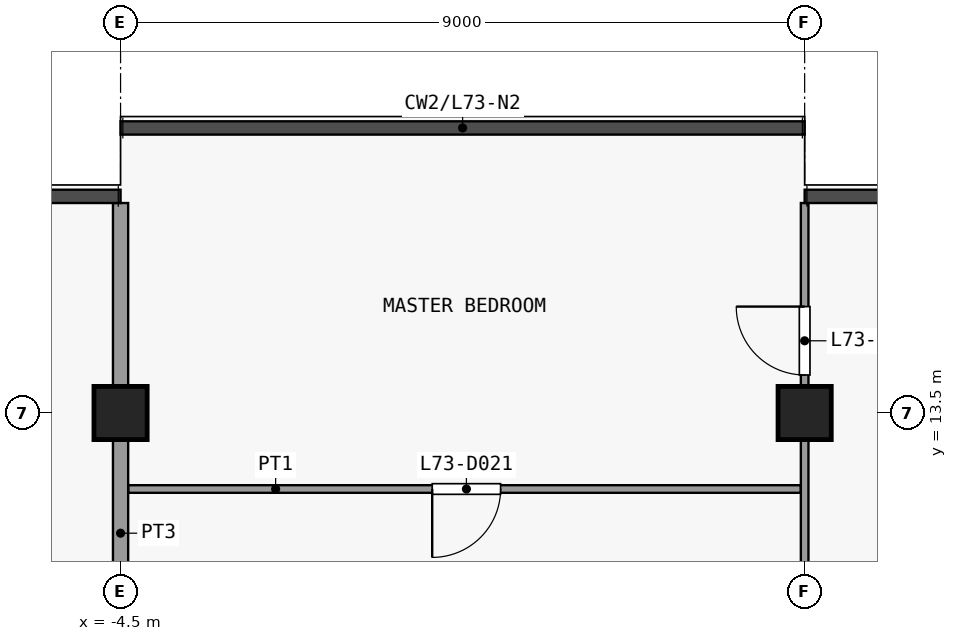
"""IFC4 building model, lengths in metres.
Left out: names, types, materials, properties, quantities, classifications, styles, units other than length and angle.
Written with IfcOpenShell. Run it as: python <this file> out.ifc"""

import sys

from ifc_helpers import new_model, si_unit, direction, frame, frame_2d, origin, origin_2d, place, context, subcontext, project, spatial, rectangle, extrude, element, fill, save


model = new_model("IFC4")
c1 = context("Model", 3, precision=1e-05, world=origin(), true_north=direction((0.0, 1.0)))
c2 = subcontext(c1, "Body", "Model", "MODEL_VIEW")
j1 = project(units=[si_unit("LENGTHUNIT", "METRE"), si_unit("PLANEANGLEUNIT", "RADIAN")], contexts=[c1])
p1 = place(None, origin())
s1 = spatial("IfcSite", under=j1, at=p1, CompositionType="ELEMENT")
p2 = place(p1, origin())
s2 = spatial("IfcBuilding", under=s1, at=p2, CompositionType="ELEMENT")
p3 = place(p2, frame((0.0, 0.0, 287.9)))
s3 = spatial("IfcBuildingStorey", under=s2, at=p3, CompositionType="ELEMENT", Elevation=287.9)
for number, where, z_axis, x_axis in (
    (1, (-4.5, 13.5, 0.0), (0.0, 0.0, 1.0), (1.0, 0.0, 0.0)),
    (2, (4.5, 13.5, 0.0), (0.0, 0.0, 1.0), (1.0, 0.0, 0.0)),
):
    element("IfcColumn", number, at=place(p3, frame(where, z_axis=z_axis, x_axis=x_axis)), inside=s3, PredefinedType="COLUMN", context=c2, shape_type="SweptSolid", body=[
        extrude(rectangle(XDim=0.7, YDim=0.7, at=origin_2d()), origin(), (0.0, 0.0, 1.0), 3.6),
    ])
p4 = place(p3, frame((-4.4, 12.5, 0.0), z_axis=(0.0, 0.0, 1.0), x_axis=(1.0, 0.0, 0.0)))
e3 = element("IfcWall", 3, at=p4, inside=s3, PredefinedType="PARTITIONING", context=c2, shape_type="SweptSolid", body=[
    extrude(rectangle(XDim=8.85, YDim=0.1, at=frame_2d((4.425, 0.0))), origin(), (0.0, 0.0, 1.0), 3.3),
])
p5 = place(p4, frame((4.0, 0.0, 0.0)))
e4 = element("IfcOpeningElement", 4, at=p5, cuts=e3, PredefinedType="OPENING", context=c2, shape_type="SweptSolid", body=[
    extrude(rectangle(XDim=0.9, YDim=2.1, at=frame_2d((0.45, 1.05))), frame((0.0, 0.06, 0.0), z_axis=(0.0, -1.0, 0.0), x_axis=(1.0, 0.0, 0.0)), (0.0, 0.0, 1.0), 0.12),
])
p6 = place(p3, frame((-4.5, 7.575, 0.0), z_axis=(0.0, 0.0, 1.0), x_axis=(0.0, 1.0, 0.0)))
e5 = element("IfcWall", 5, at=p6, inside=s3, PredefinedType="PARTITIONING", context=c2, shape_type="SweptSolid", body=[
    extrude(rectangle(XDim=8.688, YDim=0.2, at=frame_2d((4.344, 0.0))), origin(), (0.0, 0.0, 1.0), 3.3),
])
p7 = place(p3, frame((4.5, 7.575, 0.0), z_axis=(0.0, 0.0, 1.0), x_axis=(0.0, 1.0, 0.0)))
e6 = element("IfcWall", 6, at=p7, inside=s3, PredefinedType="PARTITIONING", context=c2, shape_type="SweptSolid", body=[
    extrude(rectangle(XDim=8.688, YDim=0.1, at=frame_2d((4.344, 0.0))), origin(), (0.0, 0.0, 1.0), 3.3),
])
p8 = place(p7, frame((6.425, 0.0, 0.0)))
e7 = element("IfcOpeningElement", 7, at=p8, cuts=e6, PredefinedType="OPENING", context=c2, shape_type="SweptSolid", body=[
    extrude(rectangle(XDim=0.9, YDim=2.1, at=frame_2d((0.45, 1.05))), frame((0.0, 0.06, 0.0), z_axis=(0.0, -1.0, 0.0), x_axis=(1.0, 0.0, 0.0)), (0.0, 0.0, 1.0), 0.12),
])
p9 = place(p5, origin())
e8 = element("IfcDoor", 8, at=p9, inside=s3, OperationType="SINGLE_SWING_LEFT", PredefinedType="DOOR", context=c2, shape_type="SweptSolid", body=[
    extrude(rectangle(XDim=0.9, YDim=2.1, at=frame_2d((0.45, 1.05))), frame((0.0, 0.025, 0.0), z_axis=(0.0, -1.0, 0.0), x_axis=(1.0, 0.0, 0.0)), (0.0, 0.0, 1.0), 0.05),
])
fill(e4, e8)
p10 = place(p8, origin())
e9 = element("IfcDoor", 9, at=p10, inside=s3, OperationType="SINGLE_SWING_LEFT", PredefinedType="DOOR", context=c2, shape_type="SweptSolid", body=[
    extrude(rectangle(XDim=0.9, YDim=2.1, at=frame_2d((0.45, 1.05))), frame((0.0, 0.025, 0.0), z_axis=(0.0, -1.0, 0.0), x_axis=(1.0, 0.0, 0.0)), (0.0, 0.0, 1.0), 0.05),
])
fill(e7, e9)
save(model, sys.argv[1])
